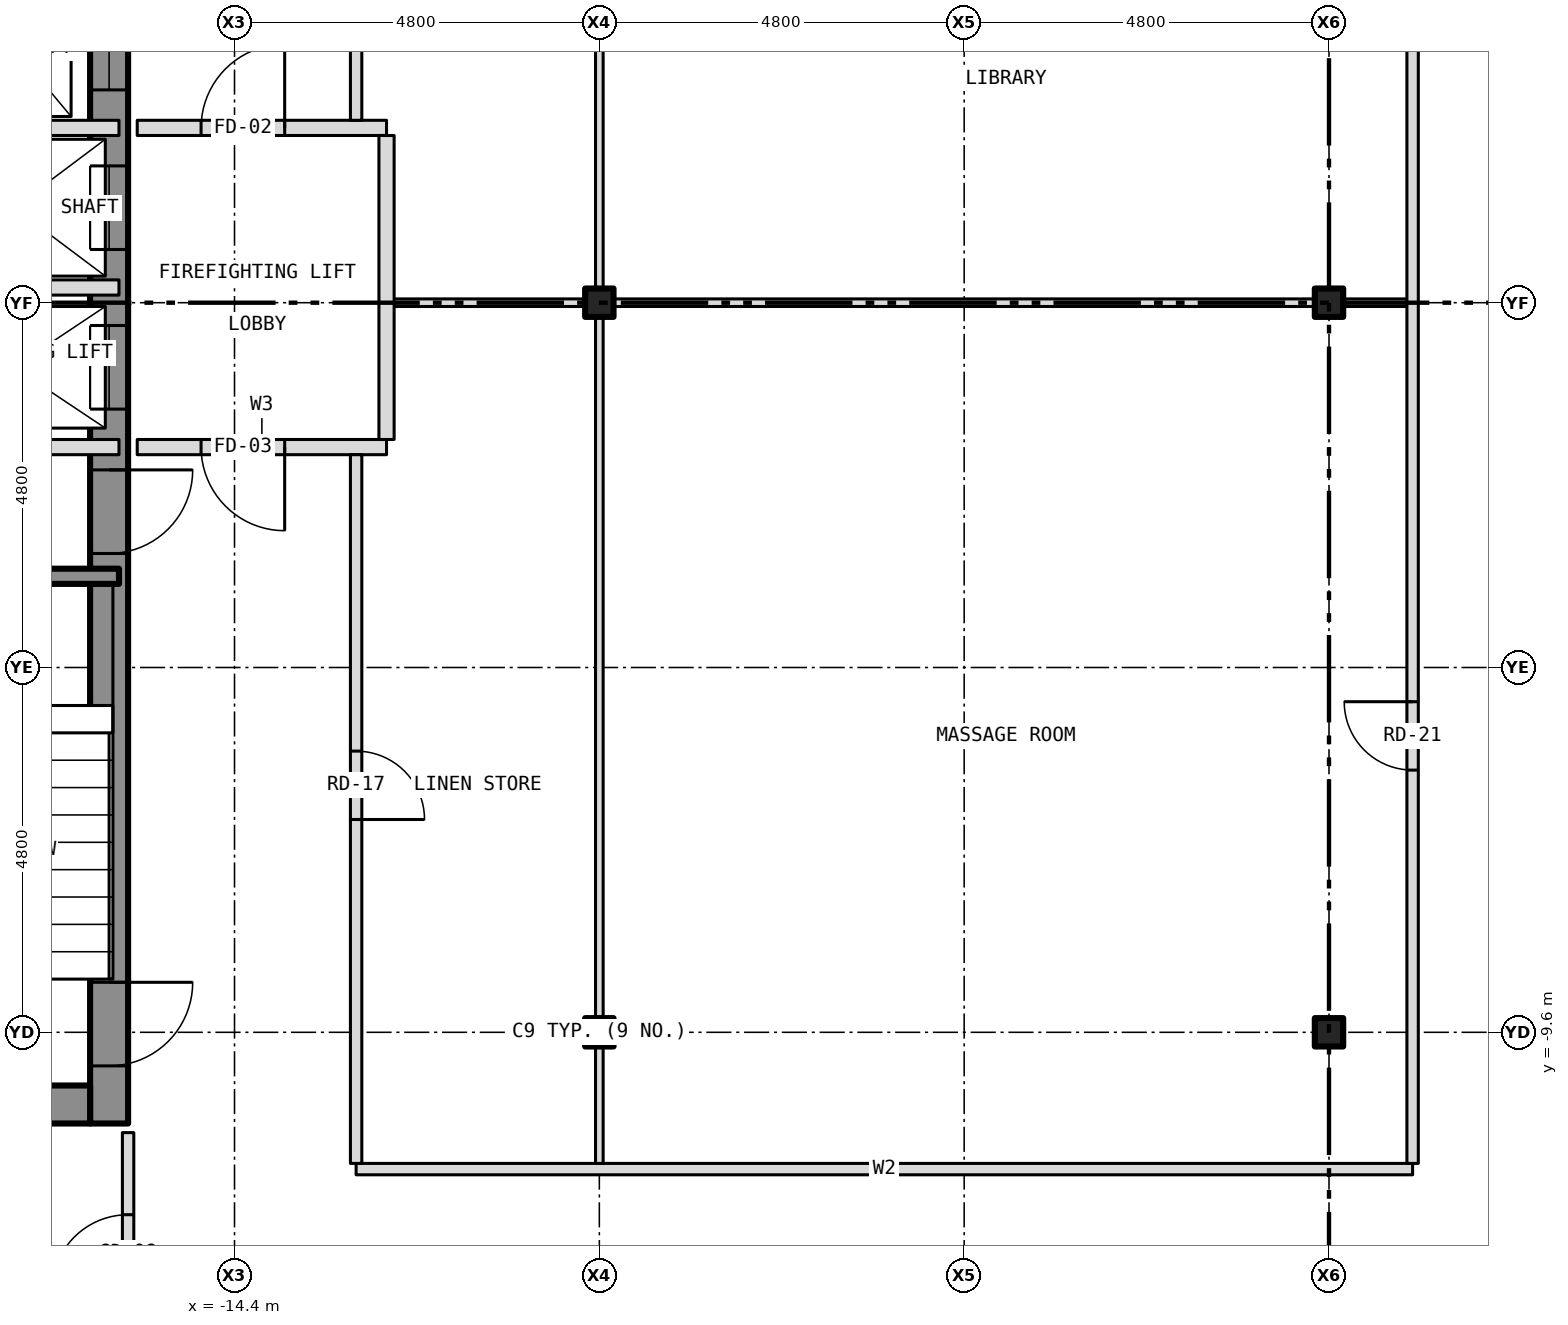
"""IFC4 building model, lengths in metres.
Left out: names, types, materials, properties, quantities, classifications, styles, units other than length and angle.
Written with IfcOpenShell. Run it as: python <this file> out.ifc"""

import sys

from ifc_helpers import new_model, si_unit, direction, frame, frame_2d, origin, origin_2d, place, context, subcontext, project, spatial, rectangle, i_section, extrude, element, fill, save


model = new_model("IFC4")
c1 = context("Model", 3, precision=1e-05, world=origin(), true_north=direction((0.0, 1.0)))
c2 = subcontext(c1, "Body", "Model", "MODEL_VIEW")
j1 = project(units=[si_unit("LENGTHUNIT", "METRE"), si_unit("PLANEANGLEUNIT", "RADIAN")], contexts=[c1])
p1 = place(None, origin())
s1 = spatial("IfcSite", under=j1, at=p1, CompositionType="ELEMENT")
p2 = place(p1, origin())
s2 = spatial("IfcBuilding", under=s1, at=p2, CompositionType="ELEMENT")
p3 = place(p2, frame((0.0, 0.0, 169.0)))
s3 = spatial("IfcBuildingStorey", under=s2, at=p3, CompositionType="ELEMENT", Elevation=169.0)
for number, where, z_axis, x_axis in (
    (1, (-9.6, -9.6, -0.15), (0.0, 0.0, 1.0), (1.0, 0.0, 0.0)),
    (2, (-9.6, 0.0, -0.15), (0.0, 0.0, 1.0), (1.0, 0.0, 0.0)),
    (3, (0.0, -9.6, -0.15), (0.0, 0.0, 1.0), (1.0, 0.0, 0.0)),
    (4, (0.0, 0.0, -0.15), (0.0, 0.0, 1.0), (1.0, 0.0, 0.0)),
):
    element("IfcColumn", number, at=place(p3, frame(where, z_axis=z_axis, x_axis=x_axis)), inside=s3, PredefinedType="COLUMN", context=c2, shape_type="SweptSolid", body=[
        extrude(i_section(OverallWidth=0.373, OverallDepth=0.373, WebThickness=0.016, FlangeThickness=0.026, at=origin_2d()), origin(), (0.0, 0.0, 1.0), 3.5),
    ])
p4 = place(p3, frame((-16.05, -10.8, 0.0), z_axis=(0.0, 0.0, 1.0), x_axis=(0.0, 1.0, 0.0)))
e5 = element("IfcWall", 5, at=p4, inside=s3, PredefinedType="SHEAR", context=c2, shape_type="SweptSolid", body=[
    extrude(rectangle(XDim=21.6, YDim=0.5, at=frame_2d((10.8, 0.0))), origin(), (0.0, 0.0, 1.0), 3.25),
])
p5 = place(p4, frame((9.4, 0.0, 0.0)))
e6 = element("IfcOpeningElement", 6, at=p5, cuts=e5, PredefinedType="OPENING", context=c2, shape_type="SweptSolid", body=[
    extrude(rectangle(XDim=1.1, YDim=2.1, at=frame_2d((0.55, 1.05))), frame((0.0, 0.262, 0.0), z_axis=(0.0, -1.0, 0.0), x_axis=(1.0, 0.0, 0.0)), (0.0, 0.0, 1.0), 0.524),
])
p6 = place(p4, frame((11.5, 0.0, 0.0)))
e7 = element("IfcOpeningElement", 7, at=p6, cuts=e5, PredefinedType="OPENING", context=c2, shape_type="SweptSolid", body=[
    extrude(rectangle(XDim=1.1, YDim=2.1, at=frame_2d((0.55, 1.05))), frame((0.0, 0.262, 0.0), z_axis=(0.0, -1.0, 0.0), x_axis=(1.0, 0.0, 0.0)), (0.0, 0.0, 1.0), 0.524),
])
p7 = place(p4, frame((13.6, 0.0, 0.0)))
e8 = element("IfcOpeningElement", 8, at=p7, cuts=e5, PredefinedType="OPENING", context=c2, shape_type="SweptSolid", body=[
    extrude(rectangle(XDim=1.1, YDim=2.1, at=frame_2d((0.55, 1.05))), frame((0.0, 0.262, 0.0), z_axis=(0.0, -1.0, 0.0), x_axis=(1.0, 0.0, 0.0)), (0.0, 0.0, 1.0), 0.524),
])
p8 = place(p4, frame((15.7, 0.0, 0.0)))
e9 = element("IfcOpeningElement", 9, at=p8, cuts=e5, PredefinedType="OPENING", context=c2, shape_type="SweptSolid", body=[
    extrude(rectangle(XDim=1.1, YDim=2.1, at=frame_2d((0.55, 1.05))), frame((0.0, 0.262, 0.0), z_axis=(0.0, -1.0, 0.0), x_axis=(1.0, 0.0, 0.0)), (0.0, 0.0, 1.0), 0.524),
])
p9 = place(p4, frame((17.8, 0.0, 0.0)))
e10 = element("IfcOpeningElement", 10, at=p9, cuts=e5, PredefinedType="OPENING", context=c2, shape_type="SweptSolid", body=[
    extrude(rectangle(XDim=1.1, YDim=2.1, at=frame_2d((0.55, 1.05))), frame((0.0, 0.262, 0.0), z_axis=(0.0, -1.0, 0.0), x_axis=(1.0, 0.0, 0.0)), (0.0, 0.0, 1.0), 0.524),
])
p10 = place(p4, frame((0.758, 0.0, 0.0)))
e11 = element("IfcOpeningElement", 11, at=p10, cuts=e5, PredefinedType="OPENING", context=c2, shape_type="SweptSolid", body=[
    extrude(rectangle(XDim=1.1, YDim=2.1, at=frame_2d((0.55, 1.05))), frame((0.0, 0.262, 0.0), z_axis=(0.0, -1.0, 0.0), x_axis=(1.0, 0.0, 0.0)), (0.0, 0.0, 1.0), 0.524),
])
p11 = place(p4, frame((7.5, 0.0, 0.0)))
e12 = element("IfcOpeningElement", 12, at=p11, cuts=e5, PredefinedType="OPENING", context=c2, shape_type="SweptSolid", body=[
    extrude(rectangle(XDim=1.1, YDim=2.1, at=frame_2d((0.55, 1.05))), frame((0.0, 0.262, 0.0), z_axis=(0.0, -1.0, 0.0), x_axis=(1.0, 0.0, 0.0)), (0.0, 0.0, 1.0), 0.524),
])
p12 = place(p4, frame((20.0, 0.0, 0.0)))
e13 = element("IfcOpeningElement", 13, at=p12, cuts=e5, PredefinedType="OPENING", context=c2, shape_type="SweptSolid", body=[
    extrude(rectangle(XDim=0.9, YDim=2.1, at=frame_2d((0.45, 1.05))), frame((0.0, 0.262, 0.0), z_axis=(0.0, -1.0, 0.0), x_axis=(1.0, 0.0, 0.0)), (0.0, 0.0, 1.0), 0.524),
])
p13 = place(p3, frame((-21.1, -10.55, 0.0), z_axis=(0.0, 0.0, 1.0), x_axis=(1.0, 0.0, 0.0)))
e14 = element("IfcWall", 14, at=p13, inside=s3, PredefinedType="SHEAR", context=c2, shape_type="SweptSolid", body=[
    extrude(rectangle(XDim=4.8, YDim=0.5, at=frame_2d((2.4, 0.0))), origin(), (0.0, 0.0, 1.0), 3.25),
])
p14 = place(p3, frame((-12.8, -11.4, 0.0), z_axis=(0.0, 0.0, 1.0), x_axis=(1.0, 0.0, 0.0)))
e15 = element("IfcWall", 15, at=p14, inside=s3, PredefinedType="PARTITIONING", context=c2, shape_type="SweptSolid", body=[
    extrude(rectangle(XDim=13.9, YDim=0.15, at=frame_2d((6.95, 0.0))), origin(), (0.0, 0.0, 1.0), 3.35),
])
p15 = place(p3, frame((-20.0, -3.6, 0.0), z_axis=(0.0, 0.0, 1.0), x_axis=(1.0, 0.0, 0.0)))
e16 = element("IfcWall", 16, at=p15, inside=s3, PredefinedType="SHEAR", context=c2, shape_type="SweptSolid", body=[
    extrude(rectangle(XDim=4.08, YDim=0.2, at=frame_2d((2.04, 0.0))), origin(), (0.0, 0.0, 1.0), 3.25),
])
p16 = place(p3, frame((-21.48, -1.9, 0.0), z_axis=(0.0, 0.0, 1.0), x_axis=(1.0, 0.0, 0.0)))
e17 = element("IfcWall", 17, at=p16, inside=s3, PredefinedType="PARTITIONING", context=c2, shape_type="SweptSolid", body=[
    extrude(rectangle(XDim=5.56, YDim=0.2, at=frame_2d((2.78, 0.0))), origin(), (0.0, 0.0, 1.0), 3.25),
])
p17 = place(p16, frame((0.83, 0.0, 0.0)))
e18 = element("IfcOpeningElement", 18, at=p17, cuts=e17, PredefinedType="OPENING", context=c2, shape_type="SweptSolid", body=[
    extrude(rectangle(XDim=0.9, YDim=2.1, at=frame_2d((0.45, 1.05))), frame((0.0, 0.112, 0.0), z_axis=(0.0, -1.0, 0.0), x_axis=(1.0, 0.0, 0.0)), (0.0, 0.0, 1.0), 0.224),
])
p18 = place(p3, frame((-15.68, -1.9, 0.0), z_axis=(0.0, 0.0, 1.0), x_axis=(1.0, 0.0, 0.0)))
e19 = element("IfcWall", 19, at=p18, inside=s3, PredefinedType="PARTITIONING", context=c2, shape_type="SweptSolid", body=[
    extrude(rectangle(XDim=3.28, YDim=0.2, at=frame_2d((1.64, 0.0))), origin(), (0.0, 0.0, 1.0), 3.35),
])
p19 = place(p18, frame((0.84, 0.0, 0.0)))
e20 = element("IfcOpeningElement", 20, at=p19, cuts=e19, PredefinedType="OPENING", context=c2, shape_type="SweptSolid", body=[
    extrude(rectangle(XDim=1.1, YDim=2.1, at=frame_2d((0.55, 1.05))), frame((0.0, 0.112, 0.0), z_axis=(0.0, -1.0, 0.0), x_axis=(1.0, 0.0, 0.0)), (0.0, 0.0, 1.0), 0.224),
])
p20 = place(p3, frame((-12.4, 0.0, 0.0), z_axis=(0.0, 0.0, 1.0), x_axis=(1.0, 0.0, 0.0)))
e21 = element("IfcWall", 21, at=p20, inside=s3, PredefinedType="PARTITIONING", context=c2, shape_type="SweptSolid", body=[
    extrude(rectangle(XDim=2.613, YDim=0.1, at=frame_2d((1.306, 0.0))), origin(), (0.0, 0.0, 1.0), 2.728),
])
p21 = place(p3, frame((-9.787, 0.0, 0.0), z_axis=(0.0, 0.0, 1.0), x_axis=(1.0, 0.0, 0.0)))
e22 = element("IfcWall", 22, at=p21, inside=s3, PredefinedType="PARTITIONING", context=c2, shape_type="SweptSolid", body=[
    extrude(rectangle(XDim=0.374, YDim=0.1, at=frame_2d((0.187, 0.0))), origin(), (0.0, 0.0, 1.0), 3.35),
])
p22 = place(p3, frame((-9.413, 0.0, 0.0), z_axis=(0.0, 0.0, 1.0), x_axis=(1.0, 0.0, 0.0)))
e23 = element("IfcWall", 23, at=p22, inside=s3, PredefinedType="PARTITIONING", context=c2, shape_type="SweptSolid", body=[
    extrude(rectangle(XDim=9.226, YDim=0.1, at=frame_2d((4.613, 0.0))), origin(), (0.0, 0.0, 1.0), 2.728),
])
p23 = place(p3, frame((-0.187, 0.0, 0.0), z_axis=(0.0, 0.0, 1.0), x_axis=(1.0, 0.0, 0.0)))
e24 = element("IfcWall", 24, at=p23, inside=s3, PredefinedType="PARTITIONING", context=c2, shape_type="SweptSolid", body=[
    extrude(rectangle(XDim=0.374, YDim=0.1, at=frame_2d((0.187, 0.0))), origin(), (0.0, 0.0, 1.0), 3.35),
])
p24 = place(p3, frame((0.187, 0.0, 0.0), z_axis=(0.0, 0.0, 1.0), x_axis=(1.0, 0.0, 0.0)))
e25 = element("IfcWall", 25, at=p24, inside=s3, PredefinedType="PARTITIONING", context=c2, shape_type="SweptSolid", body=[
    extrude(rectangle(XDim=0.913, YDim=0.1, at=frame_2d((0.457, 0.0))), origin(), (0.0, 0.0, 1.0), 2.728),
])
for number, where, z_axis, x_axis in (
    (26, (-18.8, 0.2, 0.0), (0.0, 0.0, 1.0), (1.0, 0.0, 0.0)),
    (27, (-18.8, 2.3, 0.0), (0.0, 0.0, 1.0), (1.0, 0.0, 0.0)),
):
    element("IfcWall", number, at=place(p3, frame(where, z_axis=z_axis, x_axis=x_axis)), inside=s3, PredefinedType="PARTITIONING", context=c2, shape_type="SweptSolid", body=[
        extrude(rectangle(XDim=2.88, YDim=0.2, at=frame_2d((1.44, 0.0))), origin(), (0.0, 0.0, 1.0), 3.25),
    ])
p25 = place(p3, frame((-15.68, 2.3, 0.0), z_axis=(0.0, 0.0, 1.0), x_axis=(1.0, 0.0, 0.0)))
e28 = element("IfcWall", 28, at=p25, inside=s3, PredefinedType="PARTITIONING", context=c2, shape_type="SweptSolid", body=[
    extrude(rectangle(XDim=3.28, YDim=0.2, at=frame_2d((1.64, 0.0))), origin(), (0.0, 0.0, 1.0), 3.35),
])
p26 = place(p25, frame((0.84, 0.0, 0.0)))
e29 = element("IfcOpeningElement", 29, at=p26, cuts=e28, PredefinedType="OPENING", context=c2, shape_type="SweptSolid", body=[
    extrude(rectangle(XDim=1.1, YDim=2.1, at=frame_2d((0.55, 1.05))), frame((0.0, 0.112, 0.0), z_axis=(0.0, -1.0, 0.0), x_axis=(1.0, 0.0, 0.0)), (0.0, 0.0, 1.0), 0.224),
])
p27 = place(p3, frame((-15.8, -13.525, 0.0), z_axis=(0.0, 0.0, 1.0), x_axis=(0.0, 1.0, 0.0)))
e30 = element("IfcWall", 30, at=p27, inside=s3, PredefinedType="PARTITIONING", context=c2, shape_type="SweptSolid", body=[
    extrude(rectangle(XDim=2.605, YDim=0.15, at=frame_2d((1.302, 0.0))), origin(), (0.0, 0.0, 1.0), 3.35),
])
p28 = place(p27, frame((0.525, 0.0, 0.0)))
e31 = element("IfcOpeningElement", 31, at=p28, cuts=e30, PredefinedType="OPENING", context=c2, shape_type="SweptSolid", body=[
    extrude(rectangle(XDim=1.0, YDim=2.1, at=frame_2d((0.5, 1.05))), frame((0.0, 0.087, 0.0), z_axis=(0.0, -1.0, 0.0), x_axis=(1.0, 0.0, 0.0)), (0.0, 0.0, 1.0), 0.174),
])
p29 = place(p3, frame((-12.8, -11.325, 0.0), z_axis=(0.0, 0.0, 1.0), x_axis=(0.0, 1.0, 0.0)))
e32 = element("IfcWall", 32, at=p29, inside=s3, PredefinedType="PARTITIONING", context=c2, shape_type="SweptSolid", body=[
    extrude(rectangle(XDim=9.325, YDim=0.15, at=frame_2d((4.663, 0.0))), origin(), (0.0, 0.0, 1.0), 3.35),
])
p30 = place(p29, frame((4.525, 0.0, 0.0)))
e33 = element("IfcOpeningElement", 33, at=p30, cuts=e32, PredefinedType="OPENING", context=c2, shape_type="SweptSolid", body=[
    extrude(rectangle(XDim=0.9, YDim=2.1, at=frame_2d((0.45, 1.05))), frame((0.0, 0.087, 0.0), z_axis=(0.0, -1.0, 0.0), x_axis=(1.0, 0.0, 0.0)), (0.0, 0.0, 1.0), 0.174),
])
p31 = place(p3, frame((-12.8, 2.4, 0.0), z_axis=(0.0, 0.0, 1.0), x_axis=(0.0, 1.0, 0.0)))
e34 = element("IfcWall", 34, at=p31, inside=s3, PredefinedType="PARTITIONING", context=c2, shape_type="SweptSolid", body=[
    extrude(rectangle(XDim=3.425, YDim=0.15, at=frame_2d((1.712, 0.0))), origin(), (0.0, 0.0, 1.0), 3.35),
])
p32 = place(p31, frame((1.25, 0.0, 0.0)))
e35 = element("IfcOpeningElement", 35, at=p32, cuts=e34, PredefinedType="OPENING", context=c2, shape_type="SweptSolid", body=[
    extrude(rectangle(XDim=0.9, YDim=2.1, at=frame_2d((0.45, 1.05))), frame((0.0, 0.087, 0.0), z_axis=(0.0, -1.0, 0.0), x_axis=(1.0, 0.0, 0.0)), (0.0, 0.0, 1.0), 0.174),
])
p33 = place(p3, frame((-12.4, -1.8, 0.0), z_axis=(0.0, 0.0, 1.0), x_axis=(0.0, 1.0, 0.0)))
e36 = element("IfcWall", 36, at=p33, inside=s3, PredefinedType="PARTITIONING", context=c2, shape_type="SweptSolid", body=[
    extrude(rectangle(XDim=4.0, YDim=0.2, at=frame_2d((2.0, 0.0))), origin(), (0.0, 0.0, 1.0), 3.35),
])
p34 = place(p3, frame((-9.6, -11.325, 0.0), z_axis=(0.0, 0.0, 1.0), x_axis=(0.0, 1.0, 0.0)))
e37 = element("IfcWall", 37, at=p34, inside=s3, PredefinedType="PARTITIONING", context=c2, shape_type="SweptSolid", body=[
    extrude(rectangle(XDim=1.538, YDim=0.1, at=frame_2d((0.769, 0.0))), origin(), (0.0, 0.0, 1.0), 2.728),
])
p35 = place(p3, frame((-9.6, -9.787, 0.0), z_axis=(0.0, 0.0, 1.0), x_axis=(0.0, 1.0, 0.0)))
e38 = element("IfcWall", 38, at=p35, inside=s3, PredefinedType="PARTITIONING", context=c2, shape_type="SweptSolid", body=[
    extrude(rectangle(XDim=0.374, YDim=0.1, at=frame_2d((0.187, 0.0))), origin(), (0.0, 0.0, 1.0), 3.35),
])
p36 = place(p3, frame((-9.6, -9.413, 0.0), z_axis=(0.0, 0.0, 1.0), x_axis=(0.0, 1.0, 0.0)))
e39 = element("IfcWall", 39, at=p36, inside=s3, PredefinedType="PARTITIONING", context=c2, shape_type="SweptSolid", body=[
    extrude(rectangle(XDim=9.363, YDim=0.1, at=frame_2d((4.682, 0.0))), origin(), (0.0, 0.0, 1.0), 2.728),
])
p37 = place(p3, frame((-9.6, 0.05, 0.0), z_axis=(0.0, 0.0, 1.0), x_axis=(0.0, 1.0, 0.0)))
e40 = element("IfcWall", 40, at=p37, inside=s3, PredefinedType="PARTITIONING", context=c2, shape_type="SweptSolid", body=[
    extrude(rectangle(XDim=5.775, YDim=0.1, at=frame_2d((2.887, 0.0))), origin(), (0.0, 0.0, 1.0), 2.728),
])
p38 = place(p3, frame((1.1, -11.325, 0.0), z_axis=(0.0, 0.0, 1.0), x_axis=(0.0, 1.0, 0.0)))
e41 = element("IfcWall", 41, at=p38, inside=s3, PredefinedType="PARTITIONING", context=c2, shape_type="SweptSolid", body=[
    extrude(rectangle(XDim=17.15, YDim=0.15, at=frame_2d((8.575, 0.0))), origin(), (0.0, 0.0, 1.0), 3.35),
])
p39 = place(p38, frame((5.175, 0.0, 0.0)))
e42 = element("IfcOpeningElement", 42, at=p39, cuts=e41, PredefinedType="OPENING", context=c2, shape_type="SweptSolid", body=[
    extrude(rectangle(XDim=0.9, YDim=2.1, at=frame_2d((0.45, 1.05))), frame((0.0, 0.087, 0.0), z_axis=(0.0, -1.0, 0.0), x_axis=(1.0, 0.0, 0.0)), (0.0, 0.0, 1.0), 0.174),
])
p40 = place(p5, origin())
e43 = element("IfcDoor", 43, at=p40, inside=s3, OperationType="SLIDING_TO_LEFT", PredefinedType="DOOR", context=c2, shape_type="SweptSolid", body=[
    extrude(rectangle(XDim=1.1, YDim=2.1, at=frame_2d((0.55, 1.05))), frame((0.0, 0.025, 0.0), z_axis=(0.0, -1.0, 0.0), x_axis=(1.0, 0.0, 0.0)), (0.0, 0.0, 1.0), 0.05),
])
fill(e6, e43)
p41 = place(p6, origin())
e44 = element("IfcDoor", 44, at=p41, inside=s3, OperationType="SLIDING_TO_LEFT", PredefinedType="DOOR", context=c2, shape_type="SweptSolid", body=[
    extrude(rectangle(XDim=1.1, YDim=2.1, at=frame_2d((0.55, 1.05))), frame((0.0, 0.025, 0.0), z_axis=(0.0, -1.0, 0.0), x_axis=(1.0, 0.0, 0.0)), (0.0, 0.0, 1.0), 0.05),
])
fill(e7, e44)
p42 = place(p7, origin())
e45 = element("IfcDoor", 45, at=p42, inside=s3, OperationType="SLIDING_TO_LEFT", PredefinedType="DOOR", context=c2, shape_type="SweptSolid", body=[
    extrude(rectangle(XDim=1.1, YDim=2.1, at=frame_2d((0.55, 1.05))), frame((0.0, 0.025, 0.0), z_axis=(0.0, -1.0, 0.0), x_axis=(1.0, 0.0, 0.0)), (0.0, 0.0, 1.0), 0.05),
])
fill(e8, e45)
p43 = place(p10, origin())
e46 = element("IfcDoor", 46, at=p43, inside=s3, OperationType="SINGLE_SWING_RIGHT", PredefinedType="DOOR", context=c2, shape_type="SweptSolid", body=[
    extrude(rectangle(XDim=1.1, YDim=2.1, at=frame_2d((0.55, 1.05))), frame((0.0, 0.025, 0.0), z_axis=(0.0, -1.0, 0.0), x_axis=(1.0, 0.0, 0.0)), (0.0, 0.0, 1.0), 0.05),
])
fill(e11, e46)
p44 = place(p11, origin())
e47 = element("IfcDoor", 47, at=p44, inside=s3, OperationType="SINGLE_SWING_RIGHT", PredefinedType="DOOR", context=c2, shape_type="SweptSolid", body=[
    extrude(rectangle(XDim=1.1, YDim=2.1, at=frame_2d((0.55, 1.05))), frame((0.0, 0.025, 0.0), z_axis=(0.0, -1.0, 0.0), x_axis=(1.0, 0.0, 0.0)), (0.0, 0.0, 1.0), 0.05),
])
fill(e12, e47)
p45 = place(p26, origin())
e48 = element("IfcDoor", 48, at=p45, inside=s3, OperationType="SINGLE_SWING_RIGHT", PredefinedType="DOOR", context=c2, shape_type="SweptSolid", body=[
    extrude(rectangle(XDim=1.1, YDim=2.1, at=frame_2d((0.55, 1.05))), frame((0.0, 0.025, 0.0), z_axis=(0.0, -1.0, 0.0), x_axis=(1.0, 0.0, 0.0)), (0.0, 0.0, 1.0), 0.05),
])
fill(e29, e48)
p46 = place(p19, origin())
e49 = element("IfcDoor", 49, at=p46, inside=s3, OperationType="SINGLE_SWING_RIGHT", PredefinedType="DOOR", context=c2, shape_type="SweptSolid", body=[
    extrude(rectangle(XDim=1.1, YDim=2.1, at=frame_2d((0.55, 1.05))), frame((0.0, 0.025, 0.0), z_axis=(0.0, -1.0, 0.0), x_axis=(1.0, 0.0, 0.0)), (0.0, 0.0, 1.0), 0.05),
])
fill(e20, e49)
p47 = place(p28, origin())
e50 = element("IfcDoor", 50, at=p47, inside=s3, OperationType="SINGLE_SWING_LEFT", PredefinedType="DOOR", context=c2, shape_type="SweptSolid", body=[
    extrude(rectangle(XDim=1.0, YDim=2.1, at=frame_2d((0.5, 1.05))), frame((0.0, 0.025, 0.0), z_axis=(0.0, -1.0, 0.0), x_axis=(1.0, 0.0, 0.0)), (0.0, 0.0, 1.0), 0.05),
])
fill(e31, e50)
p48 = place(p30, origin())
e51 = element("IfcDoor", 51, at=p48, inside=s3, OperationType="SINGLE_SWING_LEFT", PredefinedType="DOOR", context=c2, shape_type="SweptSolid", body=[
    extrude(rectangle(XDim=0.9, YDim=2.1, at=frame_2d((0.45, 1.05))), frame((0.0, 0.025, 0.0), z_axis=(0.0, -1.0, 0.0), x_axis=(1.0, 0.0, 0.0)), (0.0, 0.0, 1.0), 0.05),
])
fill(e33, e51)
p49 = place(p39, origin())
e52 = element("IfcDoor", 52, at=p49, inside=s3, OperationType="SINGLE_SWING_RIGHT", PredefinedType="DOOR", context=c2, shape_type="SweptSolid", body=[
    extrude(rectangle(XDim=0.9, YDim=2.1, at=frame_2d((0.45, 1.05))), frame((0.0, 0.025, 0.0), z_axis=(0.0, -1.0, 0.0), x_axis=(1.0, 0.0, 0.0)), (0.0, 0.0, 1.0), 0.05),
])
fill(e42, e52)
save(model, sys.argv[1])
